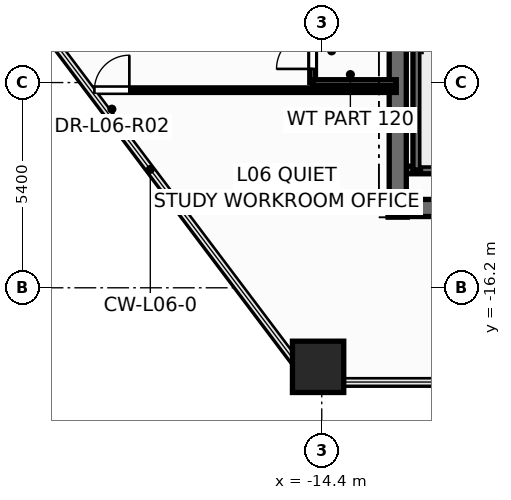
"""IFC4 building model, lengths in metres.
Left out: names, types, materials, properties, quantities, classifications, styles, units other than length and angle.
Written with IfcOpenShell. Run it as: python <this file> out.ifc"""

import sys

from ifc_helpers import new_model, si_unit, direction, frame, frame_2d, origin, origin_2d, place, context, subcontext, project, spatial, rectangle, hollow_rectangle, i_section, extrude, element, fill, save


model = new_model("IFC4")
c1 = context("Model", 3, precision=1e-05, world=origin(), true_north=direction((0.0, 1.0)))
c2 = subcontext(c1, "Body", "Model", "MODEL_VIEW")
j1 = project(units=[si_unit("LENGTHUNIT", "METRE"), si_unit("PLANEANGLEUNIT", "RADIAN")], contexts=[c1])
p1 = place(None, origin())
s1 = spatial("IfcSite", under=j1, at=p1, CompositionType="ELEMENT")
p2 = place(p1, origin())
s2 = spatial("IfcBuilding", under=s1, at=p2, CompositionType="ELEMENT")
p3 = place(p2, frame((0.0, 0.0, 27.9)))
s3 = spatial("IfcBuildingStorey", under=s2, at=p3, CompositionType="ELEMENT", Elevation=27.9)
p4 = place(p3, frame((-14.496, -18.28, 0.0), z_axis=(0.0, 0.0, 1.0), x_axis=(1.0, 0.0, 0.0)))
e1 = element("IfcColumn", 1, at=p4, inside=s3, PredefinedType="COLUMN", context=c2, shape_type="SweptSolid", body=[
    extrude(hollow_rectangle(XDim=1.35, YDim=1.35, WallThickness=0.065, at=origin_2d()), origin(), (0.0, 0.0, 1.0), 3.6),
])
p5 = place(p3, frame((-12.4, -14.1, 0.0), z_axis=(0.0, 0.0, 1.0), x_axis=(1.0, 0.0, 0.0)))
e2 = element("IfcColumn", 2, at=p5, inside=s3, PredefinedType="COLUMN", context=c2, shape_type="SweptSolid", body=[
    extrude(i_section(OverallWidth=0.5, OverallDepth=0.482, WebThickness=0.04, FlangeThickness=0.045, at=origin_2d()), origin(), (0.0, 0.0, 1.0), 3.6),
])
p6 = place(p3, frame((-12.65, -14.1, 0.0), z_axis=(0.0, 0.0, 1.0), x_axis=(1.0, 0.0, 0.0)))
e3 = element("IfcWall", 3, at=p6, inside=s3, PredefinedType="SHEAR", context=c2, shape_type="SweptSolid", body=[
    extrude(rectangle(XDim=25.3, YDim=0.45, at=frame_2d((12.65, 0.0))), origin(), (0.0, 0.0, 1.0), 3.6),
])
p7 = place(p3, frame((-12.35, -13.1, 0.0), z_axis=(0.0, 0.0, 1.0), x_axis=(1.0, 0.0, 0.0)))
e4 = element("IfcWall", 4, at=p7, inside=s3, PredefinedType="SOLIDWALL", context=c2, shape_type="SweptSolid", body=[
    extrude(rectangle(XDim=3.87, YDim=0.2, at=frame_2d((1.935, 0.0))), origin(), (0.0, 0.0, 1.0), 3.6),
])
p8 = place(p3, frame((-11.9, -13.1, 0.0), z_axis=(0.0, 0.0, 1.0), x_axis=(0.0, 1.0, 0.0)))
e5 = element("IfcWall", 5, at=p8, inside=s3, PredefinedType="SOLIDWALL", context=c2, shape_type="SweptSolid", body=[
    extrude(rectangle(XDim=7.58, YDim=0.2, at=frame_2d((3.79, 0.0))), origin(), (0.0, 0.0, 1.0), 3.6),
])
p9 = place(p3, frame((-12.4, -13.85, 0.0), z_axis=(0.0, 0.0, 1.0), x_axis=(0.0, 1.0, 0.0)))
e6 = element("IfcWall", 6, at=p9, inside=s3, PredefinedType="SHEAR", context=c2, shape_type="SweptSolid", body=[
    extrude(rectangle(XDim=9.4, YDim=0.45, at=frame_2d((4.7, 0.0))), origin(), (0.0, 0.0, 1.0), 3.6),
])
p10 = place(p3, frame((-14.64, -10.8, 0.0), z_axis=(0.0, 0.0, 1.0), x_axis=(0.0, 1.0, 0.0)))
e7 = element("IfcWall", 7, at=p10, inside=s3, PredefinedType="PARTITIONING", context=c2, shape_type="SweptSolid", body=[
    extrude(rectangle(XDim=8.16, YDim=0.15, at=frame_2d((4.08, 0.0))), origin(), (0.0, 0.0, 1.0), 2.325),
])
p11 = place(p10, frame((0.359, 0.0, 0.0)))
e8 = element("IfcOpeningElement", 8, at=p11, cuts=e7, PredefinedType="OPENING", context=c2, shape_type="SweptSolid", body=[
    extrude(rectangle(XDim=0.956, YDim=2.104, at=frame_2d((0.475, 1.052))), frame((0.0, 0.085, 0.0), z_axis=(0.0, -1.0, 0.0), x_axis=(1.0, 0.0, 0.0)), (0.0, 0.0, 1.0), 0.17),
])
p12 = place(p3, frame((-20.483, -11.0, 0.0), z_axis=(0.0, 0.0, 1.0), x_axis=(1.0, 0.0, 0.0)))
e9 = element("IfcWall", 9, at=p12, inside=s3, PredefinedType="PARTITIONING", context=c2, shape_type="SweptSolid", body=[
    extrude(rectangle(XDim=8.043, YDim=0.12, at=frame_2d((4.021, 0.0))), origin(), (0.0, 0.0, 1.0), 2.713),
])
p13 = place(p12, frame((0.1, 0.0, 0.0)))
e10 = element("IfcOpeningElement", 10, at=p13, cuts=e9, PredefinedType="OPENING", context=c2, shape_type="SweptSolid", body=[
    extrude(rectangle(XDim=0.926, YDim=2.104, at=frame_2d((0.46, 1.052))), frame((0.0, 0.07, 0.0), z_axis=(0.0, -1.0, 0.0), x_axis=(1.0, 0.0, 0.0)), (0.0, 0.0, 1.0), 0.14),
])
p14 = place(p3, frame((-14.64, -10.8, 0.0), z_axis=(0.0, 0.0, 1.0), x_axis=(1.0, 0.0, 0.0)))
e11 = element("IfcWall", 11, at=p14, inside=s3, PredefinedType="PARTITIONING", context=c2, shape_type="SweptSolid", body=[
    extrude(rectangle(XDim=2.2, YDim=0.15, at=frame_2d((1.1, 0.0))), origin(), (0.0, 0.0, 1.0), 2.713),
])
p15 = place(p11, origin())
e12 = element("IfcDoor", 12, at=p15, inside=s3, OperationType="SINGLE_SWING_LEFT", PredefinedType="DOOR", context=c2, shape_type="SweptSolid", body=[
    extrude(rectangle(XDim=0.95, YDim=2.1, at=frame_2d((0.475, 1.05))), frame((0.0, 0.025, 0.0), z_axis=(0.0, -1.0, 0.0), x_axis=(1.0, 0.0, 0.0)), (0.0, 0.0, 1.0), 0.05),
])
fill(e8, e12)
p16 = place(p13, origin())
e13 = element("IfcDoor", 13, at=p16, inside=s3, OperationType="SINGLE_SWING_RIGHT", PredefinedType="DOOR", context=c2, shape_type="SweptSolid", body=[
    extrude(rectangle(XDim=0.92, YDim=2.1, at=frame_2d((0.46, 1.05))), frame((0.0, 0.025, 0.0), z_axis=(0.0, -1.0, 0.0), x_axis=(1.0, 0.0, 0.0)), (0.0, 0.0, 1.0), 0.05),
])
fill(e10, e13)
save(model, sys.argv[1])
